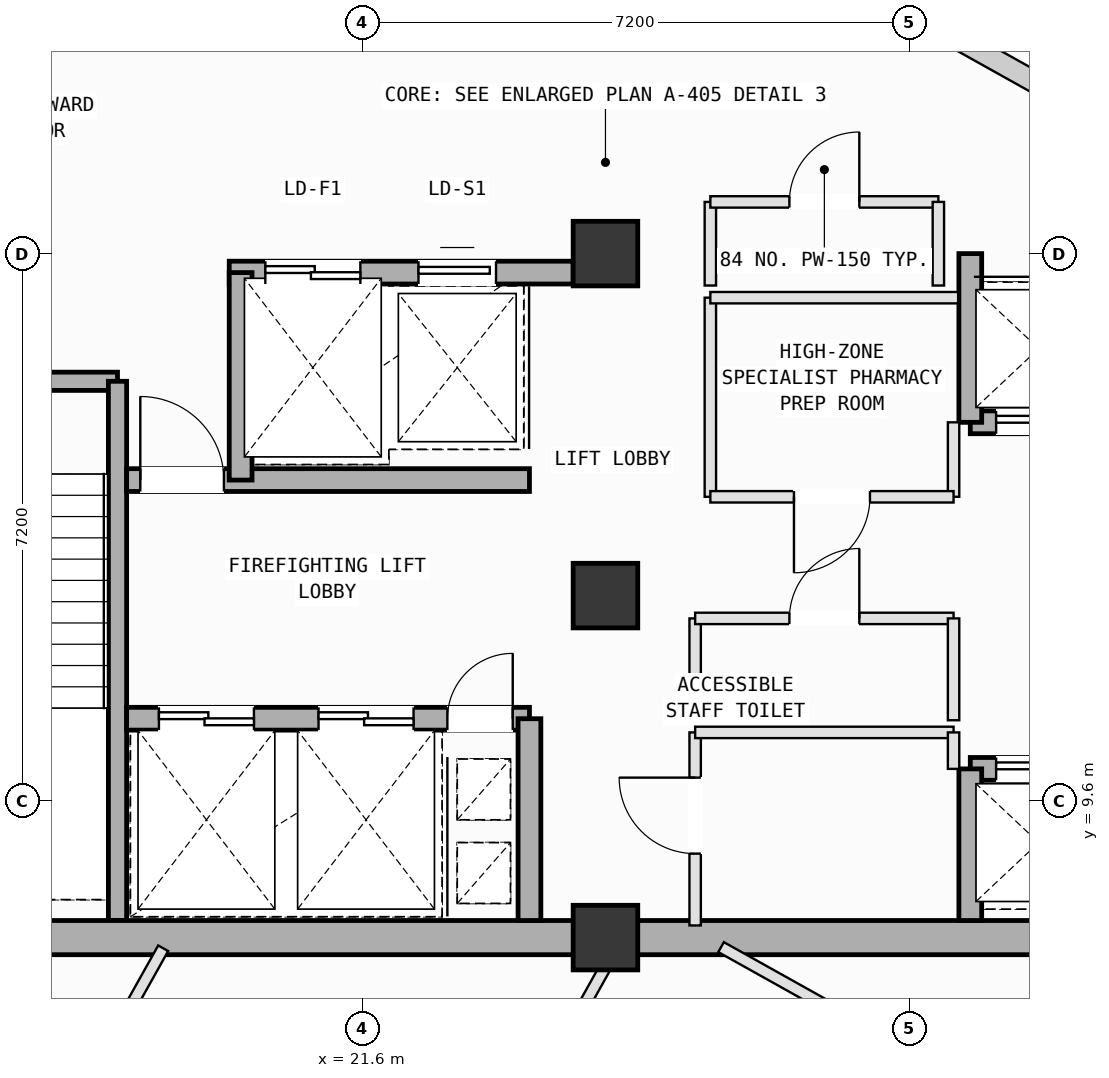
"""IFC4 building model, lengths in metres.
Left out: names, types, materials, properties, quantities, classifications, styles, units other than length and angle.
Written with IfcOpenShell. Run it as: python <this file> out.ifc"""

import sys

from ifc_helpers import new_model, si_unit, direction, frame, frame_2d, origin, origin_2d, place, context, subcontext, project, spatial, rectangle, extrude, element, fill, save


model = new_model("IFC4")
c1 = context("Model", 3, precision=1e-05, world=origin(), true_north=direction((0.0, 1.0)))
c2 = subcontext(c1, "Body", "Model", "MODEL_VIEW")
j1 = project(units=[si_unit("LENGTHUNIT", "METRE"), si_unit("PLANEANGLEUNIT", "RADIAN")], contexts=[c1])
p1 = place(None, origin())
s1 = spatial("IfcSite", under=j1, at=p1, CompositionType="ELEMENT")
p2 = place(p1, origin())
s2 = spatial("IfcBuilding", under=s1, at=p2, CompositionType="ELEMENT")
p3 = place(p2, frame((0.0, 0.0, 284.6)))
s3 = spatial("IfcBuildingStorey", under=s2, at=p3, CompositionType="ELEMENT", Elevation=284.6)
for number, where, z_axis, x_axis in (
    (1, (24.8, 7.8, 0.0), (0.0, 0.0, 1.0), (1.0, 0.0, 0.0)),
    (2, (24.8, 12.3, 0.0), (0.0, 0.0, 1.0), (1.0, 0.0, 0.0)),
    (3, (24.8, 16.8, 0.0), (0.0, 0.0, 1.0), (1.0, 0.0, 0.0)),
):
    element("IfcColumn", number, at=place(p3, frame(where, z_axis=z_axis, x_axis=x_axis)), inside=s3, PredefinedType="COLUMN", context=c2, shape_type="SweptSolid", body=[
        extrude(rectangle(XDim=0.85, YDim=0.85, at=origin_2d()), origin(), (0.0, 0.0, 1.0), 4.0),
    ])
p4 = place(p3, frame((25.21, 21.986, 0.0), z_axis=(0.0, 0.0, 1.0), x_axis=(0.872934692493, -0.48783708617, 0.0)))
e4 = element("IfcWall", 4, at=p4, inside=s3, PredefinedType="SOLIDWALL", context=c2, shape_type="SweptSolid", body=[
    extrude(rectangle(XDim=6.958, YDim=0.28, at=frame_2d((3.479, 0.0))), origin(), (0.0, 0.0, 1.0), 3.165),
])
p5 = place(p3, frame((14.92, 15.12, 0.0), z_axis=(0.0, 0.0, 1.0), x_axis=(1.0, 0.0, 0.0)))
e5 = element("IfcWall", 5, at=p5, inside=s3, PredefinedType="SOLIDWALL", context=c2, shape_type="SweptSolid", body=[
    extrude(rectangle(XDim=3.46, YDim=0.24, at=frame_2d((1.73, 0.0))), origin(), (0.0, 0.0, 1.0), 3.78),
])
p6 = place(p5, frame((0.22, 0.0, 0.0)))
e6 = element("IfcOpeningElement", 6, at=p6, cuts=e5, PredefinedType="OPENING", context=c2, shape_type="SweptSolid", body=[
    extrude(rectangle(XDim=1.1, YDim=2.15, at=frame_2d((0.55, 1.075))), frame((0.0, 0.13, 0.0), z_axis=(0.0, -1.0, 0.0), x_axis=(1.0, 0.0, 0.0)), (0.0, 0.0, 1.0), 0.26),
])
p7 = place(p3, frame((18.38, 15.12, 0.0), z_axis=(0.0, 0.0, 1.0), x_axis=(0.0, -1.0, 0.0)))
e7 = element("IfcWall", 7, at=p7, inside=s3, PredefinedType="SOLIDWALL", context=c2, shape_type="SweptSolid", body=[
    extrude(rectangle(XDim=7.095, YDim=0.24, at=frame_2d((3.548, 0.0))), origin(), (0.0, 0.0, 1.0), 3.78),
])
for number, where, z_axis, x_axis in (
    (8, (14.0, 7.8, 0.0), (0.0, 0.0, 1.0), (1.0, 0.0, 0.0)),
    (9, (24.8, 7.8, 0.0), (0.0, 0.0, 1.0), (1.0, 0.0, 0.0)),
):
    element("IfcWall", number, at=place(p3, frame(where, z_axis=z_axis, x_axis=x_axis)), inside=s3, PredefinedType="SHEAR", context=c2, shape_type="SweptSolid", body=[
        extrude(rectangle(XDim=10.8, YDim=0.45, at=frame_2d((5.4, 0.0))), origin(), (0.0, 0.0, 1.0), 3.78),
    ])
p8 = place(p3, frame((19.85, 16.55, 0.0), z_axis=(0.0, 0.0, 1.0), x_axis=(1.0, 0.0, 0.0)))
e10 = element("IfcWall", 10, at=p8, inside=s3, PredefinedType="SOLIDWALL", context=c2, shape_type="SweptSolid", body=[
    extrude(rectangle(XDim=4.525, YDim=0.3, at=frame_2d((2.262, 0.0))), origin(), (0.0, 0.0, 1.0), 3.78),
])
p9 = place(p8, frame((0.475, 0.0, 0.0)))
e11 = element("IfcOpeningElement", 11, at=p9, cuts=e10, PredefinedType="OPENING", context=c2, shape_type="SweptSolid", body=[
    extrude(rectangle(XDim=1.25, YDim=2.18, at=frame_2d((0.625, 1.09))), frame((0.0, 0.16, 0.0), z_axis=(0.0, -1.0, 0.0), x_axis=(1.0, 0.0, 0.0)), (0.0, 0.0, 1.0), 0.32),
])
p10 = place(p8, frame((2.49, 0.0, 0.0)))
e12 = element("IfcOpeningElement", 12, at=p10, cuts=e10, PredefinedType="OPENING", context=c2, shape_type="SweptSolid", body=[
    extrude(rectangle(XDim=1.02, YDim=2.12, at=frame_2d((0.51, 1.06))), frame((0.0, 0.16, 0.0), z_axis=(0.0, -1.0, 0.0), x_axis=(1.0, 0.0, 0.0)), (0.0, 0.0, 1.0), 0.32),
])
p11 = place(p3, frame((18.5, 10.68, 0.0), z_axis=(0.0, 0.0, 1.0), x_axis=(1.0, 0.0, 0.0)))
e13 = element("IfcWall", 13, at=p11, inside=s3, PredefinedType="SOLIDWALL", context=c2, shape_type="SweptSolid", body=[
    extrude(rectangle(XDim=5.3, YDim=0.3, at=frame_2d((2.65, 0.0))), origin(), (0.0, 0.0, 1.0), 3.78),
])
p12 = place(p11, frame((4.22, 0.0, 0.0)))
e14 = element("IfcOpeningElement", 14, at=p12, cuts=e13, PredefinedType="OPENING", context=c2, shape_type="SweptSolid", body=[
    extrude(rectangle(XDim=0.86, YDim=2.06, at=frame_2d((0.43, 1.03))), frame((0.0, 0.16, 0.0), z_axis=(0.0, -1.0, 0.0), x_axis=(1.0, 0.0, 0.0)), (0.0, 0.0, 1.0), 0.32),
])
p13 = place(p11, frame((0.425, 0.0, 0.0)))
e15 = element("IfcOpeningElement", 15, at=p13, cuts=e13, PredefinedType="OPENING", context=c2, shape_type="SweptSolid", body=[
    extrude(rectangle(XDim=1.25, YDim=2.18, at=frame_2d((0.625, 1.09))), frame((0.0, 0.16, 0.0), z_axis=(0.0, -1.0, 0.0), x_axis=(1.0, 0.0, 0.0)), (0.0, 0.0, 1.0), 0.32),
])
p14 = place(p11, frame((2.525, 0.0, 0.0)))
e16 = element("IfcOpeningElement", 16, at=p14, cuts=e13, PredefinedType="OPENING", context=c2, shape_type="SweptSolid", body=[
    extrude(rectangle(XDim=1.25, YDim=2.18, at=frame_2d((0.625, 1.09))), frame((0.0, 0.16, 0.0), z_axis=(0.0, -1.0, 0.0), x_axis=(1.0, 0.0, 0.0)), (0.0, 0.0, 1.0), 0.32),
])
p15 = place(p3, frame((18.5, 13.82, 0.0), z_axis=(0.0, 0.0, 1.0), x_axis=(1.0, 0.0, 0.0)))
e17 = element("IfcWall", 17, at=p15, inside=s3, PredefinedType="SOLIDWALL", context=c2, shape_type="SweptSolid", body=[
    extrude(rectangle(XDim=5.3, YDim=0.3, at=frame_2d((2.65, 0.0))), origin(), (0.0, 0.0, 1.0), 3.78),
])
p16 = place(p15, frame((0.18, 0.0, 0.0)))
e18 = element("IfcOpeningElement", 18, at=p16, cuts=e17, PredefinedType="OPENING", context=c2, shape_type="SweptSolid", body=[
    extrude(rectangle(XDim=1.1, YDim=2.15, at=frame_2d((0.55, 1.075))), frame((0.0, 0.16, 0.0), z_axis=(0.0, -1.0, 0.0), x_axis=(1.0, 0.0, 0.0)), (0.0, 0.0, 1.0), 0.32),
])
p17 = place(p3, frame((23.8, 8.025, 0.0), z_axis=(0.0, 0.0, 1.0), x_axis=(0.0, 1.0, 0.0)))
e19 = element("IfcWall", 19, at=p17, inside=s3, PredefinedType="SOLIDWALL", context=c2, shape_type="SweptSolid", body=[
    extrude(rectangle(XDim=2.655, YDim=0.3, at=frame_2d((1.328, 0.0))), origin(), (0.0, 0.0, 1.0), 3.78),
])
p18 = place(p3, frame((20.0, 13.82, 0.0), z_axis=(0.0, 0.0, 1.0), x_axis=(0.0, 1.0, 0.0)))
e20 = element("IfcWall", 20, at=p18, inside=s3, PredefinedType="SOLIDWALL", context=c2, shape_type="SweptSolid", body=[
    extrude(rectangle(XDim=2.73, YDim=0.3, at=frame_2d((1.365, 0.0))), origin(), (0.0, 0.0, 1.0), 3.78),
])
p19 = place(p3, frame((29.6, 10.02, 0.0), z_axis=(0.0, 0.0, 1.0), x_axis=(1.0, 0.0, 0.0)))
e21 = element("IfcWall", 21, at=p19, inside=s3, PredefinedType="SOLIDWALL", context=c2, shape_type="SweptSolid", body=[
    extrude(rectangle(XDim=1.7, YDim=0.3, at=frame_2d((0.85, 0.0))), origin(), (0.0, 0.0, 1.0), 3.78),
])
p20 = place(p19, frame((0.34, 0.0, 0.0)))
e22 = element("IfcOpeningElement", 22, at=p20, cuts=e21, PredefinedType="OPENING", context=c2, shape_type="SweptSolid", body=[
    extrude(rectangle(XDim=1.12, YDim=2.15, at=frame_2d((0.56, 1.075))), frame((0.0, 0.16, 0.0), z_axis=(0.0, -1.0, 0.0), x_axis=(1.0, 0.0, 0.0)), (0.0, 0.0, 1.0), 0.32),
])
p21 = place(p3, frame((29.6, 8.025, 0.0), z_axis=(0.0, 0.0, 1.0), x_axis=(0.0, 1.0, 0.0)))
e23 = element("IfcWall", 23, at=p21, inside=s3, PredefinedType="SOLIDWALL", context=c2, shape_type="SweptSolid", body=[
    extrude(rectangle(XDim=1.995, YDim=0.3, at=frame_2d((0.998, 0.0))), origin(), (0.0, 0.0, 1.0), 3.78),
])
p22 = place(p3, frame((29.6, 14.58, 0.0), z_axis=(0.0, 0.0, 1.0), x_axis=(1.0, 0.0, 0.0)))
e24 = element("IfcWall", 24, at=p22, inside=s3, PredefinedType="SOLIDWALL", context=c2, shape_type="SweptSolid", body=[
    extrude(rectangle(XDim=1.7, YDim=0.3, at=frame_2d((0.85, 0.0))), origin(), (0.0, 0.0, 1.0), 3.78),
])
p23 = place(p22, frame((0.34, 0.0, 0.0)))
e25 = element("IfcOpeningElement", 25, at=p23, cuts=e24, PredefinedType="OPENING", context=c2, shape_type="SweptSolid", body=[
    extrude(rectangle(XDim=1.12, YDim=2.15, at=frame_2d((0.56, 1.075))), frame((0.0, 0.16, 0.0), z_axis=(0.0, -1.0, 0.0), x_axis=(1.0, 0.0, 0.0)), (0.0, 0.0, 1.0), 0.32),
])
p24 = place(p3, frame((29.6, 14.58, 0.0), z_axis=(0.0, 0.0, 1.0), x_axis=(0.0, 1.0, 0.0)))
e26 = element("IfcWall", 26, at=p24, inside=s3, PredefinedType="SOLIDWALL", context=c2, shape_type="SweptSolid", body=[
    extrude(rectangle(XDim=2.22, YDim=0.3, at=frame_2d((1.11, 0.0))), origin(), (0.0, 0.0, 1.0), 3.78),
])
p25 = place(p3, frame((25.98, 7.96, 0.0), z_axis=(0.0, 0.0, 1.0), x_axis=(0.0, 1.0, 0.0)))
e27 = element("IfcWall", 27, at=p25, inside=s3, PredefinedType="PARTITIONING", context=c2, shape_type="SweptSolid", body=[
    extrude(rectangle(XDim=2.54, YDim=0.15, at=frame_2d((1.27, 0.0))), origin(), (0.0, 0.0, 1.0), 3.78),
])
p26 = place(p25, frame((0.945, 0.0, 0.0)))
e28 = element("IfcOpeningElement", 28, at=p26, cuts=e27, PredefinedType="OPENING", context=c2, shape_type="SweptSolid", body=[
    extrude(rectangle(XDim=1.0, YDim=2.12, at=frame_2d((0.5, 1.06))), frame((0.0, 0.085, 0.0), z_axis=(0.0, -1.0, 0.0), x_axis=(1.0, 0.0, 0.0)), (0.0, 0.0, 1.0), 0.17),
])
p27 = place(p3, frame((25.98, 10.5, 0.0), z_axis=(0.0, 0.0, 1.0), x_axis=(1.0, 0.0, 0.0)))
e29 = element("IfcWall", 29, at=p27, inside=s3, PredefinedType="PARTITIONING", context=c2, shape_type="SweptSolid", body=[
    extrude(rectangle(XDim=3.4, YDim=0.15, at=frame_2d((1.7, 0.0))), origin(), (0.0, 0.0, 1.0), 3.78),
])
p28 = place(p3, frame((29.38, 10.5, 0.0), z_axis=(0.0, 0.0, 1.0), x_axis=(0.0, -1.0, 0.0)))
e30 = element("IfcWall", 30, at=p28, inside=s3, PredefinedType="PARTITIONING", context=c2, shape_type="SweptSolid", body=[
    extrude(rectangle(XDim=0.48, YDim=0.15, at=frame_2d((0.24, 0.0))), origin(), (0.0, 0.0, 1.0), 3.78),
])
p29 = place(p3, frame((25.98, 10.66, 0.0), z_axis=(0.0, 0.0, 1.0), x_axis=(0.0, 1.0, 0.0)))
e31 = element("IfcWall", 31, at=p29, inside=s3, PredefinedType="PARTITIONING", context=c2, shape_type="SweptSolid", body=[
    extrude(rectangle(XDim=1.34, YDim=0.15, at=frame_2d((0.67, 0.0))), origin(), (0.0, 0.0, 1.0), 3.78),
])
p30 = place(p3, frame((25.98, 12.0, 0.0), z_axis=(0.0, 0.0, 1.0), x_axis=(1.0, 0.0, 0.0)))
e32 = element("IfcWall", 32, at=p30, inside=s3, PredefinedType="PARTITIONING", context=c2, shape_type="SweptSolid", body=[
    extrude(rectangle(XDim=3.4, YDim=0.15, at=frame_2d((1.7, 0.0))), origin(), (0.0, 0.0, 1.0), 3.78),
])
p31 = place(p30, frame((1.24, 0.0, 0.0)))
e33 = element("IfcOpeningElement", 33, at=p31, cuts=e32, PredefinedType="OPENING", context=c2, shape_type="SweptSolid", body=[
    extrude(rectangle(XDim=0.92, YDim=2.1, at=frame_2d((0.46, 1.05))), frame((0.0, 0.085, 0.0), z_axis=(0.0, -1.0, 0.0), x_axis=(1.0, 0.0, 0.0)), (0.0, 0.0, 1.0), 0.17),
])
p32 = place(p3, frame((29.38, 12.0, 0.0), z_axis=(0.0, 0.0, 1.0), x_axis=(0.0, -1.0, 0.0)))
e34 = element("IfcWall", 34, at=p32, inside=s3, PredefinedType="PARTITIONING", context=c2, shape_type="SweptSolid", body=[
    extrude(rectangle(XDim=1.34, YDim=0.15, at=frame_2d((0.67, 0.0))), origin(), (0.0, 0.0, 1.0), 3.78),
])
p33 = place(p3, frame((26.18, 13.6, 0.0), z_axis=(0.0, 0.0, 1.0), x_axis=(0.0, 1.0, 0.0)))
e35 = element("IfcWall", 35, at=p33, inside=s3, PredefinedType="PARTITIONING", context=c2, shape_type="SweptSolid", body=[
    extrude(rectangle(XDim=2.62, YDim=0.15, at=frame_2d((1.31, 0.0))), origin(), (0.0, 0.0, 1.0), 3.78),
])
p34 = place(p3, frame((26.18, 16.22, 0.0), z_axis=(0.0, 0.0, 1.0), x_axis=(1.0, 0.0, 0.0)))
e36 = element("IfcWall", 36, at=p34, inside=s3, PredefinedType="PARTITIONING", context=c2, shape_type="SweptSolid", body=[
    extrude(rectangle(XDim=3.26, YDim=0.15, at=frame_2d((1.63, 0.0))), origin(), (0.0, 0.0, 1.0), 3.78),
])
p35 = place(p3, frame((29.38, 14.58, 0.0), z_axis=(0.0, 0.0, 1.0), x_axis=(0.0, -1.0, 0.0)))
e37 = element("IfcWall", 37, at=p35, inside=s3, PredefinedType="PARTITIONING", context=c2, shape_type="SweptSolid", body=[
    extrude(rectangle(XDim=0.98, YDim=0.15, at=frame_2d((0.49, 0.0))), origin(), (0.0, 0.0, 1.0), 3.78),
])
p36 = place(p3, frame((29.38, 13.6, 0.0), z_axis=(0.0, 0.0, 1.0), x_axis=(-1.0, 0.0, 0.0)))
e38 = element("IfcWall", 38, at=p36, inside=s3, PredefinedType="PARTITIONING", context=c2, shape_type="SweptSolid", body=[
    extrude(rectangle(XDim=3.2, YDim=0.15, at=frame_2d((1.6, 0.0))), origin(), (0.0, 0.0, 1.0), 3.78),
])
p37 = place(p36, frame((1.1, 0.0, 0.0)))
e39 = element("IfcOpeningElement", 39, at=p37, cuts=e38, PredefinedType="OPENING", context=c2, shape_type="SweptSolid", body=[
    extrude(rectangle(XDim=1.0, YDim=2.12, at=frame_2d((0.5, 1.06))), frame((0.0, 0.085, 0.0), z_axis=(0.0, -1.0, 0.0), x_axis=(1.0, 0.0, 0.0)), (0.0, 0.0, 1.0), 0.17),
])
p38 = place(p3, frame((26.18, 16.38, 0.0), z_axis=(0.0, 0.0, 1.0), x_axis=(0.0, 1.0, 0.0)))
e40 = element("IfcWall", 40, at=p38, inside=s3, PredefinedType="PARTITIONING", context=c2, shape_type="SweptSolid", body=[
    extrude(rectangle(XDim=1.1, YDim=0.15, at=frame_2d((0.55, 0.0))), origin(), (0.0, 0.0, 1.0), 3.78),
])
p39 = place(p3, frame((26.18, 17.48, 0.0), z_axis=(0.0, 0.0, 1.0), x_axis=(1.0, 0.0, 0.0)))
e41 = element("IfcWall", 41, at=p39, inside=s3, PredefinedType="PARTITIONING", context=c2, shape_type="SweptSolid", body=[
    extrude(rectangle(XDim=3.0, YDim=0.15, at=frame_2d((1.5, 0.0))), origin(), (0.0, 0.0, 1.0), 3.78),
])
p40 = place(p39, frame((1.04, 0.0, 0.0)))
e42 = element("IfcOpeningElement", 42, at=p40, cuts=e41, PredefinedType="OPENING", context=c2, shape_type="SweptSolid", body=[
    extrude(rectangle(XDim=0.92, YDim=2.1, at=frame_2d((0.46, 1.05))), frame((0.0, 0.085, 0.0), z_axis=(0.0, -1.0, 0.0), x_axis=(1.0, 0.0, 0.0)), (0.0, 0.0, 1.0), 0.17),
])
p41 = place(p3, frame((29.18, 17.48, 0.0), z_axis=(0.0, 0.0, 1.0), x_axis=(0.0, -1.0, 0.0)))
e43 = element("IfcWall", 43, at=p41, inside=s3, PredefinedType="PARTITIONING", context=c2, shape_type="SweptSolid", body=[
    extrude(rectangle(XDim=1.1, YDim=0.15, at=frame_2d((0.55, 0.0))), origin(), (0.0, 0.0, 1.0), 3.78),
])
p42 = place(p3, frame((20.963, 0.548, 0.0), z_axis=(0.0, 0.0, 1.0), x_axis=(0.48783303812, 0.872936954721, 0.0)))
e44 = element("IfcWall", 44, at=p42, inside=s3, PredefinedType="PARTITIONING", context=c2, shape_type="SweptSolid", body=[
    extrude(rectangle(XDim=7.964, YDim=0.15, at=frame_2d((3.982, 0.0))), origin(), (0.0, 0.0, 1.0), 3.78),
])
p43 = place(p3, frame((26.321, 7.675, 0.0), z_axis=(0.0, 0.0, 1.0), x_axis=(0.87290046745, -0.487898323348, 0.0)))
e45 = element("IfcWall", 45, at=p43, inside=s3, PredefinedType="PARTITIONING", context=c2, shape_type="SweptSolid", body=[
    extrude(rectangle(XDim=3.839, YDim=0.15, at=frame_2d((1.919, 0.0))), origin(), (0.0, 0.0, 1.0), 3.78),
])
p44 = place(p3, frame((16.423, 3.085, 0.0), z_axis=(0.0, 0.0, 1.0), x_axis=(0.488006126724, 0.872840203176, 0.0)))
e46 = element("IfcWall", 46, at=p44, inside=s3, PredefinedType="PARTITIONING", context=c2, shape_type="SweptSolid", body=[
    extrude(rectangle(XDim=5.241, YDim=0.15, at=frame_2d((2.621, 0.0))), origin(), (0.0, 0.0, 1.0), 3.78),
])
p45 = place(p12, origin())
e47 = element("IfcDoor", 47, at=p45, inside=s3, OperationType="SINGLE_SWING_RIGHT", PredefinedType="DOOR", context=c2, shape_type="SweptSolid", body=[
    extrude(rectangle(XDim=0.86, YDim=2.06, at=frame_2d((0.43, 1.03))), frame((0.0, 0.025, 0.0), z_axis=(0.0, -1.0, 0.0), x_axis=(1.0, 0.0, 0.0)), (0.0, 0.0, 1.0), 0.05),
])
fill(e14, e47)
p46 = place(p16, origin())
e48 = element("IfcDoor", 48, at=p46, inside=s3, OperationType="SINGLE_SWING_LEFT", PredefinedType="DOOR", context=c2, shape_type="SweptSolid", body=[
    extrude(rectangle(XDim=1.1, YDim=2.15, at=frame_2d((0.55, 1.075))), frame((0.0, 0.025, 0.0), z_axis=(0.0, -1.0, 0.0), x_axis=(1.0, 0.0, 0.0)), (0.0, 0.0, 1.0), 0.05),
])
fill(e18, e48)
p47 = place(p13, origin())
e49 = element("IfcDoor", 49, at=p47, inside=s3, OperationType="DOUBLE_DOOR_SLIDING", PredefinedType="DOOR", context=c2, shape_type="SweptSolid", body=[
    extrude(rectangle(XDim=1.25, YDim=2.18, at=frame_2d((0.625, 1.09))), frame((0.0, 0.025, 0.0), z_axis=(0.0, -1.0, 0.0), x_axis=(1.0, 0.0, 0.0)), (0.0, 0.0, 1.0), 0.05),
])
fill(e15, e49)
p48 = place(p14, origin())
e50 = element("IfcDoor", 50, at=p48, inside=s3, OperationType="DOUBLE_DOOR_SLIDING", PredefinedType="DOOR", context=c2, shape_type="SweptSolid", body=[
    extrude(rectangle(XDim=1.25, YDim=2.18, at=frame_2d((0.625, 1.09))), frame((0.0, 0.025, 0.0), z_axis=(0.0, -1.0, 0.0), x_axis=(1.0, 0.0, 0.0)), (0.0, 0.0, 1.0), 0.05),
])
fill(e16, e50)
p49 = place(p20, origin())
e51 = element("IfcDoor", 51, at=p49, inside=s3, OperationType="DOUBLE_DOOR_SLIDING", PredefinedType="DOOR", context=c2, shape_type="SweptSolid", body=[
    extrude(rectangle(XDim=1.12, YDim=2.15, at=frame_2d((0.56, 1.075))), frame((0.0, 0.025, 0.0), z_axis=(0.0, -1.0, 0.0), x_axis=(1.0, 0.0, 0.0)), (0.0, 0.0, 1.0), 0.05),
])
fill(e22, e51)
p50 = place(p23, origin())
e52 = element("IfcDoor", 52, at=p50, inside=s3, OperationType="DOUBLE_DOOR_SLIDING", PredefinedType="DOOR", context=c2, shape_type="SweptSolid", body=[
    extrude(rectangle(XDim=1.12, YDim=2.15, at=frame_2d((0.56, 1.075))), frame((0.0, 0.025, 0.0), z_axis=(0.0, -1.0, 0.0), x_axis=(1.0, 0.0, 0.0)), (0.0, 0.0, 1.0), 0.05),
])
fill(e25, e52)
p51 = place(p9, origin())
e53 = element("IfcDoor", 53, at=p51, inside=s3, OperationType="DOUBLE_DOOR_SLIDING", PredefinedType="DOOR", context=c2, shape_type="SweptSolid", body=[
    extrude(rectangle(XDim=1.25, YDim=2.18, at=frame_2d((0.625, 1.09))), frame((0.0, 0.025, 0.0), z_axis=(0.0, -1.0, 0.0), x_axis=(1.0, 0.0, 0.0)), (0.0, 0.0, 1.0), 0.05),
])
fill(e11, e53)
p52 = place(p10, origin())
e54 = element("IfcDoor", 54, at=p52, inside=s3, OperationType="SLIDING_TO_LEFT", PredefinedType="DOOR", context=c2, shape_type="SweptSolid", body=[
    extrude(rectangle(XDim=1.02, YDim=2.12, at=frame_2d((0.51, 1.06))), frame((0.0, 0.025, 0.0), z_axis=(0.0, -1.0, 0.0), x_axis=(1.0, 0.0, 0.0)), (0.0, 0.0, 1.0), 0.05),
])
fill(e12, e54)
p53 = place(p26, origin())
e55 = element("IfcDoor", 55, at=p53, inside=s3, OperationType="SINGLE_SWING_RIGHT", PredefinedType="DOOR", context=c2, shape_type="SweptSolid", body=[
    extrude(rectangle(XDim=1.0, YDim=2.12, at=frame_2d((0.5, 1.06))), frame((0.0, 0.025, 0.0), z_axis=(0.0, -1.0, 0.0), x_axis=(1.0, 0.0, 0.0)), (0.0, 0.0, 1.0), 0.05),
])
fill(e28, e55)
p54 = place(p31, origin())
e56 = element("IfcDoor", 56, at=p54, inside=s3, OperationType="SINGLE_SWING_RIGHT", PredefinedType="DOOR", context=c2, shape_type="SweptSolid", body=[
    extrude(rectangle(XDim=0.92, YDim=2.1, at=frame_2d((0.46, 1.05))), frame((0.0, 0.025, 0.0), z_axis=(0.0, -1.0, 0.0), x_axis=(1.0, 0.0, 0.0)), (0.0, 0.0, 1.0), 0.05),
])
fill(e33, e56)
p55 = place(p37, origin())
e57 = element("IfcDoor", 57, at=p55, inside=s3, OperationType="SINGLE_SWING_RIGHT", PredefinedType="DOOR", context=c2, shape_type="SweptSolid", body=[
    extrude(rectangle(XDim=1.0, YDim=2.12, at=frame_2d((0.5, 1.06))), frame((0.0, 0.025, 0.0), z_axis=(0.0, -1.0, 0.0), x_axis=(1.0, 0.0, 0.0)), (0.0, 0.0, 1.0), 0.05),
])
fill(e39, e57)
p56 = place(p40, origin())
e58 = element("IfcDoor", 58, at=p56, inside=s3, OperationType="SINGLE_SWING_RIGHT", PredefinedType="DOOR", context=c2, shape_type="SweptSolid", body=[
    extrude(rectangle(XDim=0.92, YDim=2.1, at=frame_2d((0.46, 1.05))), frame((0.0, 0.025, 0.0), z_axis=(0.0, -1.0, 0.0), x_axis=(1.0, 0.0, 0.0)), (0.0, 0.0, 1.0), 0.05),
])
fill(e42, e58)
save(model, sys.argv[1])
